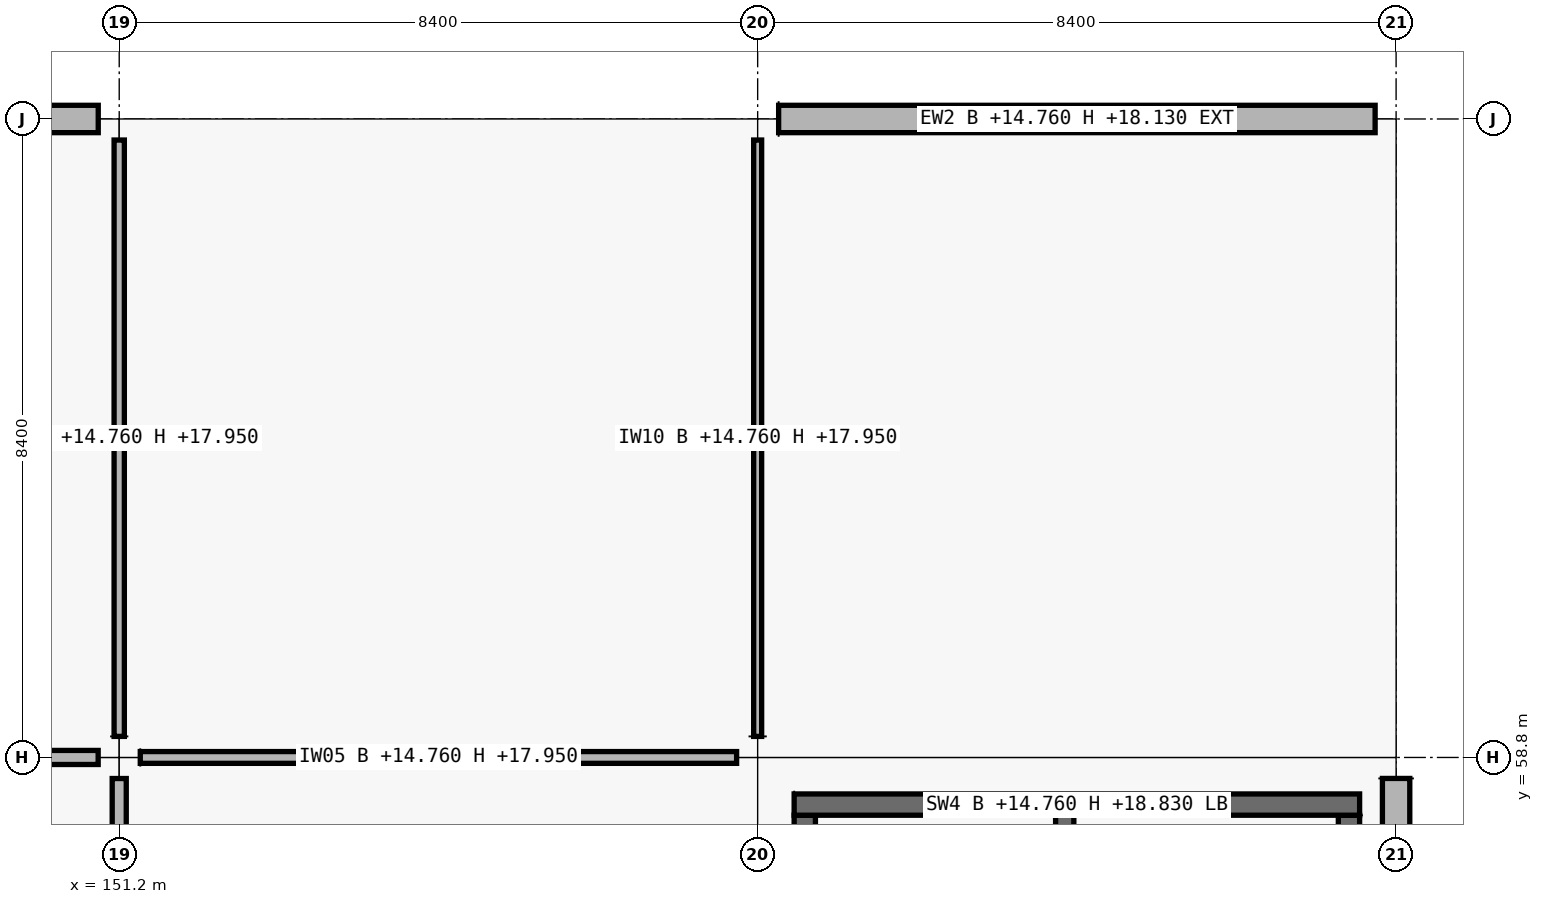
"""IFC4 building model, lengths in metres.
Left out: names, types, materials, properties, quantities, classifications, styles, units other than length and angle.
Written with IfcOpenShell. Run it as: python <this file> out.ifc"""

import sys

from ifc_helpers import new_model, si_unit, direction, frame, frame_2d, origin, origin_2d, place, context, subcontext, project, spatial, rectangle, i_section, extrude, element, fill, save


model = new_model("IFC4")
c1 = context("Model", 3, precision=1e-05, world=origin(), true_north=direction((0.0, 1.0)))
c2 = subcontext(c1, "Body", "Model", "MODEL_VIEW")
j1 = project(units=[si_unit("LENGTHUNIT", "METRE"), si_unit("PLANEANGLEUNIT", "RADIAN")], contexts=[c1])
p1 = place(None, origin())
s1 = spatial("IfcSite", under=j1, at=p1, CompositionType="ELEMENT")
p2 = place(p1, origin())
s2 = spatial("IfcBuilding", under=s1, at=p2, CompositionType="ELEMENT")
p3 = place(p2, frame((0.0, 0.0, 14.76)))
s3 = spatial("IfcBuildingStorey", under=s2, at=p3, CompositionType="ELEMENT", Elevation=14.76)
for number, where, z_axis, x_axis in (
    (1, (151.2, 58.8, 0.0), (0.0, 0.0, 1.0), (1.0, 0.0, 0.0)),
    (2, (151.2, 67.2, 0.0), (0.0, 0.0, 1.0), (1.0, 0.0, 0.0)),
    (3, (159.6, 58.8, 0.0), (0.0, 0.0, 1.0), (1.0, 0.0, 0.0)),
    (4, (159.6, 67.2, 0.0), (0.0, 0.0, 1.0), (1.0, 0.0, 0.0)),
    (5, (168.0, 58.8, 0.0), (0.0, 0.0, 1.0), (1.0, 0.0, 0.0)),
    (6, (168.0, 67.2, 0.0), (0.0, 0.0, 1.0), (1.0, 0.0, 0.0)),
):
    element("IfcColumn", number, at=place(p3, frame(where, z_axis=z_axis, x_axis=x_axis)), inside=s3, PredefinedType="COLUMN", context=c2, shape_type="SweptSolid", body=[
        extrude(rectangle(XDim=0.55, YDim=0.55, at=origin_2d()), origin(), (0.0, 0.0, 1.0), 4.17),
    ])
for number, where, z_axis, x_axis in (
    (7, (151.2, 58.8, 4.17), (0.0, 0.0, 1.0), (1.0, 0.0, 0.0)),
    (8, (159.6, 58.8, 4.17), (0.0, 0.0, 1.0), (1.0, 0.0, 0.0)),
    (9, (167.86, 58.8, 4.17), (0.0, 0.0, 1.0), (1.0, 0.0, 0.0)),
):
    element("IfcColumn", number, at=place(p3, frame(where, z_axis=z_axis, x_axis=x_axis)), inside=s3, PredefinedType="COLUMN", context=c2, shape_type="SweptSolid", body=[
        extrude(i_section(OverallWidth=0.254, OverallDepth=0.254, WebThickness=0.009, FlangeThickness=0.014, FilletRadius=0.013, at=origin_2d()), origin(), (0.0, 0.0, 1.0), 2.157),
    ])
p4 = place(p3, frame((143.076, 67.2, 0.0), z_axis=(0.0, 0.0, 1.0), x_axis=(1.0, 0.0, 0.0)))
e10 = element("IfcWall", 10, at=p4, inside=s3, PredefinedType="SOLIDWALL", context=c2, shape_type="SweptSolid", body=[
    extrude(rectangle(XDim=7.848, YDim=0.36, at=frame_2d((3.924, 0.0))), origin(), (0.0, 0.0, 1.0), 3.37),
])
p5 = place(p4, frame((3.024, 0.0, 0.9)))
e11 = element("IfcOpeningElement", 11, at=p5, cuts=e10, PredefinedType="OPENING", context=c2, shape_type="SweptSolid", body=[
    extrude(rectangle(XDim=1.8, YDim=1.35, at=frame_2d((0.9, 0.675))), frame((0.0, 0.18, 0.0), z_axis=(0.0, -1.0, 0.0), x_axis=(1.0, 0.0, 0.0)), (0.0, 0.0, 1.0), 0.36),
])
p6 = place(p3, frame((168.0, 58.524, 0.0), z_axis=(0.0, 0.0, 1.0), x_axis=(0.0, -1.0, 0.0)))
e12 = element("IfcWall", 12, at=p6, inside=s3, PredefinedType="SOLIDWALL", context=c2, shape_type="SweptSolid", body=[
    extrude(rectangle(XDim=7.848, YDim=0.36, at=frame_2d((3.924, 0.0))), origin(), (0.0, 0.0, 1.0), 3.37),
])
p7 = place(p3, frame((159.876, 67.2, 0.0), z_axis=(0.0, 0.0, 1.0), x_axis=(1.0, 0.0, 0.0)))
e13 = element("IfcWall", 13, at=p7, inside=s3, PredefinedType="SOLIDWALL", context=c2, shape_type="SweptSolid", body=[
    extrude(rectangle(XDim=7.848, YDim=0.36, at=frame_2d((3.924, 0.0))), origin(), (0.0, 0.0, 1.0), 3.37),
])
p8 = place(p7, frame((3.224, 0.0, 0.9)))
e14 = element("IfcOpeningElement", 14, at=p8, cuts=e13, PredefinedType="OPENING", context=c2, shape_type="SweptSolid", body=[
    extrude(rectangle(XDim=1.4, YDim=1.75, at=frame_2d((0.7, 0.875))), frame((0.0, 0.18, 0.0), z_axis=(0.0, -1.0, 0.0), x_axis=(1.0, 0.0, 0.0)), (0.0, 0.0, 1.0), 0.36),
])
p9 = place(p3, frame((160.22, 51.16, 0.0), z_axis=(0.0, 0.0, 1.0), x_axis=(0.0, 1.0, 0.0)))
e15 = element("IfcWall", 15, at=p9, inside=s3, PredefinedType="SHEAR", context=c2, shape_type="SweptSolid", body=[
    extrude(rectangle(XDim=6.88, YDim=0.28, at=frame_2d((3.44, 0.0))), origin(), (0.0, 0.0, 1.0), 4.07),
])
p10 = place(p3, frame((160.08, 58.18, 0.0), z_axis=(0.0, 0.0, 1.0), x_axis=(1.0, 0.0, 0.0)))
e16 = element("IfcWall", 16, at=p10, inside=s3, PredefinedType="SHEAR", context=c2, shape_type="SweptSolid", body=[
    extrude(rectangle(XDim=7.44, YDim=0.28, at=frame_2d((3.72, 0.0))), origin(), (0.0, 0.0, 1.0), 4.07),
])
p11 = place(p3, frame((167.38, 58.04, 0.0), z_axis=(0.0, 0.0, 1.0), x_axis=(0.0, -1.0, 0.0)))
e17 = element("IfcWall", 17, at=p11, inside=s3, PredefinedType="SHEAR", context=c2, shape_type="SweptSolid", body=[
    extrude(rectangle(XDim=6.88, YDim=0.28, at=frame_2d((3.44, 0.0))), origin(), (0.0, 0.0, 1.0), 4.07),
])
p12 = place(p3, frame((163.64, 51.16, 0.0), z_axis=(0.0, 0.0, 1.0), x_axis=(0.0, 1.0, 0.0)))
e18 = element("IfcWall", 18, at=p12, inside=s3, PredefinedType="SHEAR", context=c2, shape_type="SweptSolid", body=[
    extrude(rectangle(XDim=6.88, YDim=0.24, at=frame_2d((3.44, 0.0))), origin(), (0.0, 0.0, 1.0), 4.07),
])
p13 = place(p12, frame((0.12, 0.0, 0.0)))
e19 = element("IfcOpeningElement", 19, at=p13, cuts=e18, PredefinedType="OPENING", context=c2, shape_type="SweptSolid", body=[
    extrude(rectangle(XDim=1.0, YDim=2.15, at=frame_2d((0.5, 1.075))), frame((0.0, 0.12, 0.0), z_axis=(0.0, -1.0, 0.0), x_axis=(1.0, 0.0, 0.0)), (0.0, 0.0, 1.0), 0.24),
])
p14 = place(p3, frame((143.077, 58.8, 0.0), z_axis=(0.0, 0.0, 1.0), x_axis=(1.0, 0.0, 0.0)))
e20 = element("IfcWall", 20, at=p14, inside=s3, PredefinedType="PARTITIONING", context=c2, shape_type="SweptSolid", body=[
    extrude(rectangle(XDim=7.846, YDim=0.185, at=frame_2d((3.923, 0.0))), origin(), (0.0, 0.0, 1.0), 3.19),
])
p15 = place(p3, frame((151.477, 58.8, 0.0), z_axis=(0.0, 0.0, 1.0), x_axis=(1.0, 0.0, 0.0)))
e21 = element("IfcWall", 21, at=p15, inside=s3, PredefinedType="PARTITIONING", context=c2, shape_type="SweptSolid", body=[
    extrude(rectangle(XDim=7.846, YDim=0.155, at=frame_2d((3.923, 0.0))), origin(), (0.0, 0.0, 1.0), 3.19),
])
p16 = place(p15, frame((3.383, 0.0, 0.0)))
e22 = element("IfcOpeningElement", 22, at=p16, cuts=e21, PredefinedType="OPENING", context=c2, shape_type="SweptSolid", body=[
    extrude(rectangle(XDim=1.08, YDim=2.25, at=frame_2d((0.54, 1.125))), frame((0.0, 0.078, 0.0), z_axis=(0.0, -1.0, 0.0), x_axis=(1.0, 0.0, 0.0)), (0.0, 0.0, 1.0), 0.155),
])
p17 = place(p3, frame((151.2, 50.677, 0.0), z_axis=(0.0, 0.0, 1.0), x_axis=(0.0, 1.0, 0.0)))
e23 = element("IfcWall", 23, at=p17, inside=s3, PredefinedType="PARTITIONING", context=c2, shape_type="SweptSolid", body=[
    extrude(rectangle(XDim=7.846, YDim=0.185, at=frame_2d((3.923, 0.0))), origin(), (0.0, 0.0, 1.0), 3.19),
])
p18 = place(p3, frame((151.2, 59.077, 0.0), z_axis=(0.0, 0.0, 1.0), x_axis=(0.0, 1.0, 0.0)))
e24 = element("IfcWall", 24, at=p18, inside=s3, PredefinedType="PARTITIONING", context=c2, shape_type="SweptSolid", body=[
    extrude(rectangle(XDim=7.846, YDim=0.135, at=frame_2d((3.923, 0.0))), origin(), (0.0, 0.0, 1.0), 3.19),
])
p19 = place(p18, frame((3.443, 0.0, 0.0)))
e25 = element("IfcOpeningElement", 25, at=p19, cuts=e24, PredefinedType="OPENING", context=c2, shape_type="SweptSolid", body=[
    extrude(rectangle(XDim=0.96, YDim=2.18, at=frame_2d((0.48, 1.09))), frame((0.0, 0.067, 0.0), z_axis=(0.0, -1.0, 0.0), x_axis=(1.0, 0.0, 0.0)), (0.0, 0.0, 1.0), 0.135),
])
p20 = place(p3, frame((159.6, 59.077, 0.0), z_axis=(0.0, 0.0, 1.0), x_axis=(0.0, 1.0, 0.0)))
e26 = element("IfcWall", 26, at=p20, inside=s3, PredefinedType="PARTITIONING", context=c2, shape_type="SweptSolid", body=[
    extrude(rectangle(XDim=7.846, YDim=0.105, at=frame_2d((3.923, 0.0))), origin(), (0.0, 0.0, 1.0), 3.19),
])
p21 = place(p20, frame((3.463, 0.0, 0.0)))
e27 = element("IfcOpeningElement", 27, at=p21, cuts=e26, PredefinedType="OPENING", context=c2, shape_type="SweptSolid", body=[
    extrude(rectangle(XDim=0.92, YDim=2.15, at=frame_2d((0.46, 1.075))), frame((0.0, 0.052, 0.0), z_axis=(0.0, -1.0, 0.0), x_axis=(1.0, 0.0, 0.0)), (0.0, 0.0, 1.0), 0.105),
])
p22 = place(p8, origin())
e28 = element("IfcWindow", 28, at=p22, inside=s3, PartitioningType="SINGLE_PANEL", PredefinedType="WINDOW", context=c2, shape_type="SweptSolid", body=[
    extrude(rectangle(XDim=1.4, YDim=1.75, at=frame_2d((0.7, 0.875))), frame((0.0, 0.03, 0.0), z_axis=(0.0, -1.0, 0.0), x_axis=(1.0, 0.0, 0.0)), (0.0, 0.0, 1.0), 0.06),
])
fill(e14, e28)
p23 = place(p16, origin())
e29 = element("IfcDoor", 29, at=p23, inside=s3, OperationType="SINGLE_SWING_RIGHT", PredefinedType="DOOR", context=c2, shape_type="SweptSolid", body=[
    extrude(rectangle(XDim=1.08, YDim=2.25, at=frame_2d((0.54, 1.125))), frame((0.0, 0.025, 0.0), z_axis=(0.0, -1.0, 0.0), x_axis=(1.0, 0.0, 0.0)), (0.0, 0.0, 1.0), 0.05),
])
fill(e22, e29)
p24 = place(p19, origin())
e30 = element("IfcDoor", 30, at=p24, inside=s3, OperationType="SINGLE_SWING_RIGHT", PredefinedType="DOOR", context=c2, shape_type="SweptSolid", body=[
    extrude(rectangle(XDim=0.96, YDim=2.18, at=frame_2d((0.48, 1.09))), frame((0.0, 0.025, 0.0), z_axis=(0.0, -1.0, 0.0), x_axis=(1.0, 0.0, 0.0)), (0.0, 0.0, 1.0), 0.05),
])
fill(e25, e30)
p25 = place(p21, origin())
e31 = element("IfcDoor", 31, at=p25, inside=s3, OperationType="SINGLE_SWING_RIGHT", PredefinedType="DOOR", context=c2, shape_type="SweptSolid", body=[
    extrude(rectangle(XDim=0.92, YDim=2.15, at=frame_2d((0.46, 1.075))), frame((0.0, 0.025, 0.0), z_axis=(0.0, -1.0, 0.0), x_axis=(1.0, 0.0, 0.0)), (0.0, 0.0, 1.0), 0.05),
])
fill(e27, e31)
save(model, sys.argv[1])
